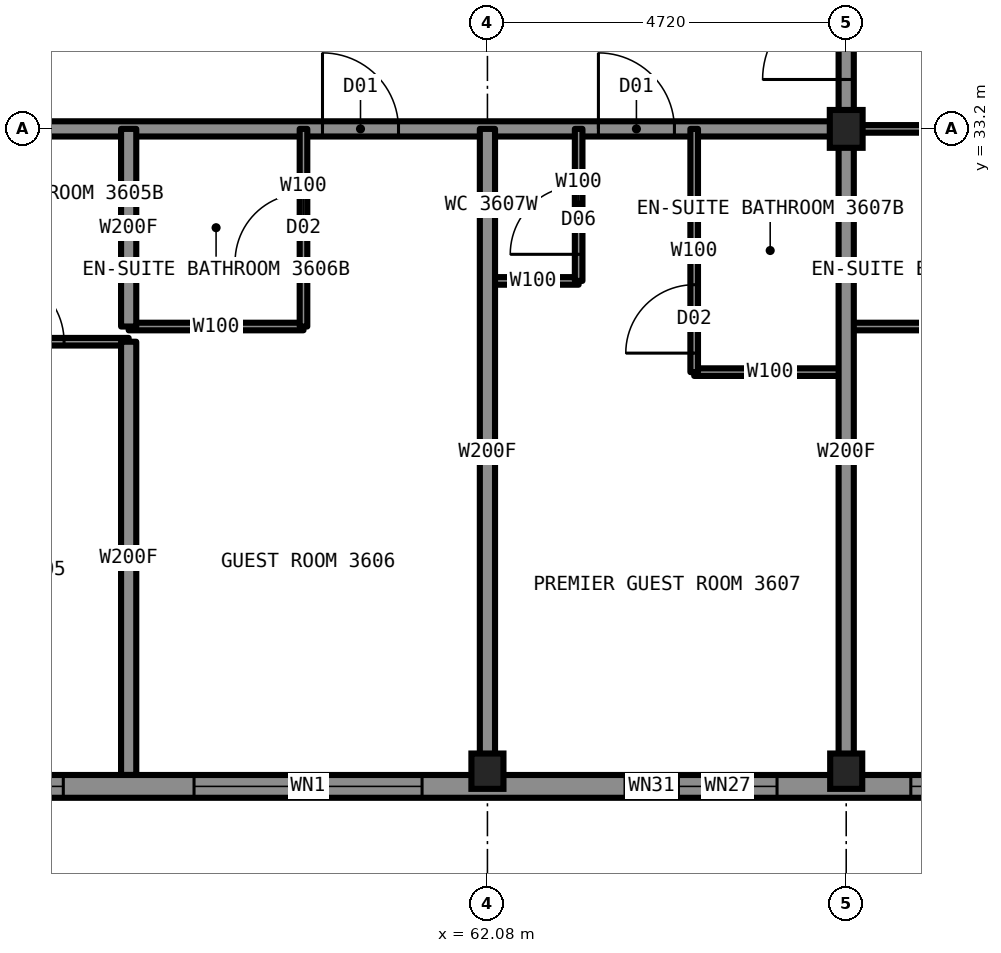
"""IFC4 building model, lengths in metres.
Left out: names, types, materials, properties, quantities, classifications, styles, units other than length and angle.
Written with IfcOpenShell. Run it as: python <this file> out.ifc"""

import sys

from ifc_helpers import new_model, si_unit, direction, frame, frame_2d, origin, origin_2d, place, context, subcontext, project, spatial, rectangle, i_section, extrude, element, fill, save


model = new_model("IFC4")
c1 = context("Model", 3, precision=1e-05, world=origin(), true_north=direction((0.0, 1.0)))
c2 = subcontext(c1, "Body", "Model", "MODEL_VIEW")
j1 = project(units=[si_unit("LENGTHUNIT", "METRE"), si_unit("PLANEANGLEUNIT", "RADIAN")], contexts=[c1])
p1 = place(None, origin())
s1 = spatial("IfcSite", under=j1, at=p1, CompositionType="ELEMENT")
p2 = place(p1, origin())
s2 = spatial("IfcBuilding", under=s1, at=p2, CompositionType="ELEMENT")
p3 = place(p2, frame((0.0, 0.0, 135.4)))
s3 = spatial("IfcBuildingStorey", under=s2, at=p3, CompositionType="ELEMENT", Elevation=135.4)
for number, where, z_axis, x_axis in (
    (1, (62.08, 24.75, 0.0), (0.0, 0.0, 1.0), (1.0, 0.0, 0.0)),
    (2, (66.8, 24.75, 0.0), (0.0, 0.0, 1.0), (1.0, 0.0, 0.0)),
):
    element("IfcColumn", number, at=place(p3, frame(where, z_axis=z_axis, x_axis=x_axis)), inside=s3, PredefinedType="COLUMN", context=c2, shape_type="SweptSolid", body=[
        extrude(i_section(OverallWidth=0.422, OverallDepth=0.465, WebThickness=0.045, FlangeThickness=0.073, at=origin_2d()), origin(), (0.0, 0.0, 1.0), 3.5),
    ])
p4 = place(p3, frame((66.8, 33.2, 0.0), z_axis=(0.0, 0.0, 1.0), x_axis=(1.0, 0.0, 0.0)))
e3 = element("IfcColumn", 3, at=p4, inside=s3, PredefinedType="COLUMN", context=c2, shape_type="SweptSolid", body=[
    extrude(i_section(OverallWidth=0.432, OverallDepth=0.498, WebThickness=0.056, FlangeThickness=0.089, at=origin_2d()), origin(), (0.0, 0.0, 1.0), 3.5),
])
p5 = place(p3, frame((66.8, 33.2, 0.0), z_axis=(0.0, 0.0, 1.0), x_axis=(1.0, 0.0, 0.0)))
e4 = element("IfcWall", 4, at=p5, inside=s3, PredefinedType="PARTITIONING", context=c2, shape_type="SweptSolid", body=[
    extrude(rectangle(XDim=2.6, YDim=0.1, at=frame_2d((1.3, 0.0))), origin(), (0.0, 0.0, 1.0), 2.573),
])
p6 = place(p3, frame((43.2, 33.2, 0.0), z_axis=(0.0, 0.0, 1.0), x_axis=(1.0, 0.0, 0.0)))
e5 = element("IfcWall", 5, at=p6, inside=s3, PredefinedType="PARTITIONING", context=c2, shape_type="SweptSolid", body=[
    extrude(rectangle(XDim=23.6, YDim=0.2, at=frame_2d((11.8, 0.0))), origin(), (0.0, 0.0, 1.0), 3.33),
])
p7 = place(p6, frame((3.0, 0.0, 0.0)))
e6 = element("IfcOpeningElement", 6, at=p7, cuts=e5, PredefinedType="OPENING", context=c2, shape_type="SweptSolid", body=[
    extrude(rectangle(XDim=1.0, YDim=2.2, at=frame_2d((0.5, 1.1))), frame((0.0, 0.11, 0.0), z_axis=(0.0, -1.0, 0.0), x_axis=(1.0, 0.0, 0.0)), (0.0, 0.0, 1.0), 0.22),
])
p8 = place(p6, frame((9.84, 0.0, 0.0)))
e7 = element("IfcOpeningElement", 7, at=p8, cuts=e5, PredefinedType="OPENING", context=c2, shape_type="SweptSolid", body=[
    extrude(rectangle(XDim=1.0, YDim=2.2, at=frame_2d((0.5, 1.1))), frame((0.0, 0.11, 0.0), z_axis=(0.0, -1.0, 0.0), x_axis=(1.0, 0.0, 0.0)), (0.0, 0.0, 1.0), 0.22),
])
p9 = place(p6, frame((16.71, 0.0, 0.0)))
e8 = element("IfcOpeningElement", 8, at=p9, cuts=e5, PredefinedType="OPENING", context=c2, shape_type="SweptSolid", body=[
    extrude(rectangle(XDim=1.0, YDim=2.2, at=frame_2d((0.5, 1.1))), frame((0.0, 0.11, 0.0), z_axis=(0.0, -1.0, 0.0), x_axis=(1.0, 0.0, 0.0)), (0.0, 0.0, 1.0), 0.22),
])
p10 = place(p6, frame((20.34, 0.0, 0.0)))
e9 = element("IfcOpeningElement", 9, at=p10, cuts=e5, PredefinedType="OPENING", context=c2, shape_type="SweptSolid", body=[
    extrude(rectangle(XDim=1.0, YDim=2.2, at=frame_2d((0.5, 1.1))), frame((0.0, 0.11, 0.0), z_axis=(0.0, -1.0, 0.0), x_axis=(1.0, 0.0, 0.0)), (0.0, 0.0, 1.0), 0.22),
])
p11 = place(p3, frame((62.08, 31.2, 0.0), z_axis=(0.0, 0.0, 1.0), x_axis=(1.0, 0.0, 0.0)))
e10 = element("IfcWall", 10, at=p11, inside=s3, PredefinedType="PARTITIONING", context=c2, shape_type="SweptSolid", body=[
    extrude(rectangle(XDim=1.2, YDim=0.1, at=frame_2d((0.6, 0.0))), origin(), (0.0, 0.0, 1.0), 3.33),
])
p12 = place(p3, frame((57.36, 30.6, 0.0), z_axis=(0.0, 0.0, 1.0), x_axis=(1.0, 0.0, 0.0)))
e11 = element("IfcWall", 11, at=p12, inside=s3, PredefinedType="PARTITIONING", context=c2, shape_type="SweptSolid", body=[
    extrude(rectangle(XDim=2.3, YDim=0.1, at=frame_2d((1.15, 0.0))), origin(), (0.0, 0.0, 1.0), 3.33),
])
p13 = place(p3, frame((66.8, 30.6, 0.0), z_axis=(0.0, 0.0, 1.0), x_axis=(1.0, 0.0, 0.0)))
e12 = element("IfcWall", 12, at=p13, inside=s3, PredefinedType="PARTITIONING", context=c2, shape_type="SweptSolid", body=[
    extrude(rectangle(XDim=2.6, YDim=0.1, at=frame_2d((1.3, 0.0))), origin(), (0.0, 0.0, 1.0), 3.33),
])
p14 = place(p3, frame((54.76, 30.4, 0.0), z_axis=(0.0, 0.0, 1.0), x_axis=(1.0, 0.0, 0.0)))
e13 = element("IfcWall", 13, at=p14, inside=s3, PredefinedType="PARTITIONING", context=c2, shape_type="SweptSolid", body=[
    extrude(rectangle(XDim=2.6, YDim=0.1, at=frame_2d((1.3, 0.0))), origin(), (0.0, 0.0, 1.0), 3.33),
])
p15 = place(p14, frame((0.85, 0.0, 0.0)))
e14 = element("IfcOpeningElement", 14, at=p15, cuts=e13, PredefinedType="OPENING", context=c2, shape_type="SweptSolid", body=[
    extrude(rectangle(XDim=0.9, YDim=2.1, at=frame_2d((0.45, 1.05))), frame((0.0, 0.06, 0.0), z_axis=(0.0, -1.0, 0.0), x_axis=(1.0, 0.0, 0.0)), (0.0, 0.0, 1.0), 0.12),
])
p16 = place(p3, frame((64.8, 30.0, 0.0), z_axis=(0.0, 0.0, 1.0), x_axis=(1.0, 0.0, 0.0)))
e15 = element("IfcWall", 15, at=p16, inside=s3, PredefinedType="PARTITIONING", context=c2, shape_type="SweptSolid", body=[
    extrude(rectangle(XDim=2.0, YDim=0.1, at=frame_2d((1.0, 0.0))), origin(), (0.0, 0.0, 1.0), 2.731),
])
p17 = place(p3, frame((66.8, 33.2, 0.0), z_axis=(0.0, 0.0, 1.0), x_axis=(0.0, 1.0, 0.0)))
e16 = element("IfcWall", 16, at=p17, inside=s3, PredefinedType="PARTITIONING", context=c2, shape_type="SweptSolid", body=[
    extrude(rectangle(XDim=23.6, YDim=0.2, at=frame_2d((11.8, 0.0))), origin(), (0.0, 0.0, 1.0), 3.33),
])
p18 = place(p17, frame((7.27, 0.0, 0.0)))
e17 = element("IfcOpeningElement", 17, at=p18, cuts=e16, PredefinedType="OPENING", context=c2, shape_type="SweptSolid", body=[
    extrude(rectangle(XDim=1.0, YDim=2.2, at=frame_2d((0.5, 1.1))), frame((0.0, 0.11, 0.0), z_axis=(0.0, -1.0, 0.0), x_axis=(1.0, 0.0, 0.0)), (0.0, 0.0, 1.0), 0.22),
])
p19 = place(p17, frame((11.99, 0.0, 0.0)))
e18 = element("IfcOpeningElement", 18, at=p19, cuts=e16, PredefinedType="OPENING", context=c2, shape_type="SweptSolid", body=[
    extrude(rectangle(XDim=1.0, YDim=2.2, at=frame_2d((0.5, 1.1))), frame((0.0, 0.11, 0.0), z_axis=(0.0, -1.0, 0.0), x_axis=(1.0, 0.0, 0.0)), (0.0, 0.0, 1.0), 0.22),
])
p20 = place(p17, frame((17.31, 0.0, 0.0)))
e19 = element("IfcOpeningElement", 19, at=p20, cuts=e16, PredefinedType="OPENING", context=c2, shape_type="SweptSolid", body=[
    extrude(rectangle(XDim=1.0, YDim=2.2, at=frame_2d((0.5, 1.1))), frame((0.0, 0.11, 0.0), z_axis=(0.0, -1.0, 0.0), x_axis=(1.0, 0.0, 0.0)), (0.0, 0.0, 1.0), 0.22),
])
p21 = place(p17, frame((21.85, 0.0, 0.0)))
e20 = element("IfcOpeningElement", 20, at=p21, cuts=e16, PredefinedType="OPENING", context=c2, shape_type="SweptSolid", body=[
    extrude(rectangle(XDim=1.1, YDim=2.2, at=frame_2d((0.55, 1.1))), frame((0.0, 0.11, 0.0), z_axis=(0.0, -1.0, 0.0), x_axis=(1.0, 0.0, 0.0)), (0.0, 0.0, 1.0), 0.22),
])
p22 = place(p17, frame((0.65, 0.0, 0.0)))
e21 = element("IfcOpeningElement", 21, at=p22, cuts=e16, PredefinedType="OPENING", context=c2, shape_type="SweptSolid", body=[
    extrude(rectangle(XDim=1.1, YDim=2.2, at=frame_2d((0.55, 1.1))), frame((0.0, 0.11, 0.0), z_axis=(0.0, -1.0, 0.0), x_axis=(1.0, 0.0, 0.0)), (0.0, 0.0, 1.0), 0.22),
])
p23 = place(p3, frame((66.8, 24.7, 0.0), z_axis=(0.0, 0.0, 1.0), x_axis=(0.0, 1.0, 0.0)))
e22 = element("IfcWall", 22, at=p23, inside=s3, PredefinedType="PARTITIONING", context=c2, shape_type="SweptSolid", body=[
    extrude(rectangle(XDim=8.5, YDim=0.2, at=frame_2d((4.25, 0.0))), origin(), (0.0, 0.0, 1.0), 2.573),
])
p24 = place(p3, frame((57.36, 24.7, 0.0), z_axis=(0.0, 0.0, 1.0), x_axis=(0.0, 1.0, 0.0)))
e23 = element("IfcWall", 23, at=p24, inside=s3, PredefinedType="PARTITIONING", context=c2, shape_type="SweptSolid", body=[
    extrude(rectangle(XDim=5.7, YDim=0.2, at=frame_2d((2.85, 0.0))), origin(), (0.0, 0.0, 1.0), 3.33),
])
p25 = place(p3, frame((57.36, 30.6, 0.0), z_axis=(0.0, 0.0, 1.0), x_axis=(0.0, 1.0, 0.0)))
e24 = element("IfcWall", 24, at=p25, inside=s3, PredefinedType="PARTITIONING", context=c2, shape_type="SweptSolid", body=[
    extrude(rectangle(XDim=2.6, YDim=0.2, at=frame_2d((1.3, 0.0))), origin(), (0.0, 0.0, 1.0), 3.33),
])
p26 = place(p3, frame((59.66, 30.6, 0.0), z_axis=(0.0, 0.0, 1.0), x_axis=(0.0, 1.0, 0.0)))
e25 = element("IfcWall", 25, at=p26, inside=s3, PredefinedType="PARTITIONING", context=c2, shape_type="SweptSolid", body=[
    extrude(rectangle(XDim=2.6, YDim=0.1, at=frame_2d((1.3, 0.0))), origin(), (0.0, 0.0, 1.0), 3.33),
])
p27 = place(p26, frame((0.85, 0.0, 0.0)))
e26 = element("IfcOpeningElement", 26, at=p27, cuts=e25, PredefinedType="OPENING", context=c2, shape_type="SweptSolid", body=[
    extrude(rectangle(XDim=0.9, YDim=2.1, at=frame_2d((0.45, 1.05))), frame((0.0, 0.06, 0.0), z_axis=(0.0, -1.0, 0.0), x_axis=(1.0, 0.0, 0.0)), (0.0, 0.0, 1.0), 0.12),
])
p28 = place(p3, frame((62.08, 24.7, 0.0), z_axis=(0.0, 0.0, 1.0), x_axis=(0.0, 1.0, 0.0)))
e27 = element("IfcWall", 27, at=p28, inside=s3, PredefinedType="PARTITIONING", context=c2, shape_type="SweptSolid", body=[
    extrude(rectangle(XDim=8.5, YDim=0.2, at=frame_2d((4.25, 0.0))), origin(), (0.0, 0.0, 1.0), 2.573),
])
p29 = place(p3, frame((63.28, 31.2, 0.0), z_axis=(0.0, 0.0, 1.0), x_axis=(0.0, 1.0, 0.0)))
e28 = element("IfcWall", 28, at=p29, inside=s3, PredefinedType="PARTITIONING", context=c2, shape_type="SweptSolid", body=[
    extrude(rectangle(XDim=2.0, YDim=0.1, at=frame_2d((1.0, 0.0))), origin(), (0.0, 0.0, 1.0), 3.33),
])
p30 = place(p29, frame((0.35, 0.0, 0.0)))
e29 = element("IfcOpeningElement", 29, at=p30, cuts=e28, PredefinedType="OPENING", context=c2, shape_type="SweptSolid", body=[
    extrude(rectangle(XDim=0.9, YDim=2.1, at=frame_2d((0.45, 1.05))), frame((0.0, 0.06, 0.0), z_axis=(0.0, -1.0, 0.0), x_axis=(1.0, 0.0, 0.0)), (0.0, 0.0, 1.0), 0.12),
])
p31 = place(p3, frame((64.8, 30.0, 0.0), z_axis=(0.0, 0.0, 1.0), x_axis=(0.0, 1.0, 0.0)))
e30 = element("IfcWall", 30, at=p31, inside=s3, PredefinedType="PARTITIONING", context=c2, shape_type="SweptSolid", body=[
    extrude(rectangle(XDim=3.2, YDim=0.1, at=frame_2d((1.6, 0.0))), origin(), (0.0, 0.0, 1.0), 3.33),
])
p32 = place(p31, frame((0.25, 0.0, 0.0)))
e31 = element("IfcOpeningElement", 31, at=p32, cuts=e30, PredefinedType="OPENING", context=c2, shape_type="SweptSolid", body=[
    extrude(rectangle(XDim=0.9, YDim=2.1, at=frame_2d((0.45, 1.05))), frame((0.0, 0.06, 0.0), z_axis=(0.0, -1.0, 0.0), x_axis=(1.0, 0.0, 0.0)), (0.0, 0.0, 1.0), 0.12),
])
p33 = place(p3, frame((39.9, 24.55, 0.0), z_axis=(0.0, 0.0, 1.0), x_axis=(1.0, 0.0, 0.0)))
e32 = element("IfcWall", 32, at=p33, inside=s3, PredefinedType="SOLIDWALL", context=c2, shape_type="SweptSolid", body=[
    extrude(rectangle(XDim=30.2, YDim=0.3, at=frame_2d((15.1, 0.0))), origin(), (0.0, 0.0, 1.0), 2.83),
])
p34 = place(p33, frame((0.85, 0.0, 0.5)))
e33 = element("IfcOpeningElement", 33, at=p34, cuts=e32, PredefinedType="OPENING", context=c2, shape_type="SweptSolid", body=[
    extrude(rectangle(XDim=1.6, YDim=2.0, at=frame_2d((0.8, 1.0))), frame((0.0, 0.16, 0.0), z_axis=(0.0, -1.0, 0.0), x_axis=(1.0, 0.0, 0.0)), (0.0, 0.0, 1.0), 0.32),
])
p35 = place(p33, frame((4.16, 0.0, 0.5)))
e34 = element("IfcOpeningElement", 34, at=p35, cuts=e32, PredefinedType="OPENING", context=c2, shape_type="SweptSolid", body=[
    extrude(rectangle(XDim=1.3, YDim=1.9, at=frame_2d((0.65, 0.95))), frame((0.0, 0.16, 0.0), z_axis=(0.0, -1.0, 0.0), x_axis=(1.0, 0.0, 0.0)), (0.0, 0.0, 1.0), 0.32),
])
p36 = place(p33, frame((8.88, 0.0, 0.5)))
e35 = element("IfcOpeningElement", 35, at=p36, cuts=e32, PredefinedType="OPENING", context=c2, shape_type="SweptSolid", body=[
    extrude(rectangle(XDim=3.0, YDim=2.0, at=frame_2d((1.5, 1.0))), frame((0.0, 0.16, 0.0), z_axis=(0.0, -1.0, 0.0), x_axis=(1.0, 0.0, 0.0)), (0.0, 0.0, 1.0), 0.32),
])
p37 = place(p33, frame((13.6, 0.0, 0.5)))
e36 = element("IfcOpeningElement", 36, at=p37, cuts=e32, PredefinedType="OPENING", context=c2, shape_type="SweptSolid", body=[
    extrude(rectangle(XDim=3.0, YDim=2.0, at=frame_2d((1.5, 1.0))), frame((0.0, 0.16, 0.0), z_axis=(0.0, -1.0, 0.0), x_axis=(1.0, 0.0, 0.0)), (0.0, 0.0, 1.0), 0.32),
])
p38 = place(p33, frame((18.32, 0.0, 0.5)))
e37 = element("IfcOpeningElement", 37, at=p38, cuts=e32, PredefinedType="OPENING", context=c2, shape_type="SweptSolid", body=[
    extrude(rectangle(XDim=3.0, YDim=2.0, at=frame_2d((1.5, 1.0))), frame((0.0, 0.16, 0.0), z_axis=(0.0, -1.0, 0.0), x_axis=(1.0, 0.0, 0.0)), (0.0, 0.0, 1.0), 0.32),
])
p39 = place(p33, frame((24.69, 0.0, 0.5)))
e38 = element("IfcOpeningElement", 38, at=p39, cuts=e32, PredefinedType="OPENING", context=c2, shape_type="SweptSolid", body=[
    extrude(rectangle(XDim=1.3, YDim=1.9, at=frame_2d((0.65, 0.95))), frame((0.0, 0.16, 0.0), z_axis=(0.0, -1.0, 0.0), x_axis=(1.0, 0.0, 0.0)), (0.0, 0.0, 1.0), 0.32),
])
p40 = place(p33, frame((27.75, 0.0, 0.5)))
e39 = element("IfcOpeningElement", 39, at=p40, cuts=e32, PredefinedType="OPENING", context=c2, shape_type="SweptSolid", body=[
    extrude(rectangle(XDim=1.6, YDim=2.0, at=frame_2d((0.8, 1.0))), frame((0.0, 0.16, 0.0), z_axis=(0.0, -1.0, 0.0), x_axis=(1.0, 0.0, 0.0)), (0.0, 0.0, 1.0), 0.32),
])
p41 = place(p33, frame((5.51, 0.0, 0.5)))
e40 = element("IfcOpeningElement", 40, at=p41, cuts=e32, PredefinedType="OPENING", context=c2, shape_type="SweptSolid", body=[
    extrude(rectangle(XDim=0.7, YDim=0.9, at=frame_2d((0.35, 0.45))), frame((0.0, 0.16, 0.0), z_axis=(0.0, -1.0, 0.0), x_axis=(1.0, 0.0, 0.0)), (0.0, 0.0, 1.0), 0.32),
])
p42 = place(p33, frame((23.99, 0.0, 0.5)))
e41 = element("IfcOpeningElement", 41, at=p42, cuts=e32, PredefinedType="OPENING", context=c2, shape_type="SweptSolid", body=[
    extrude(rectangle(XDim=0.7, YDim=0.9, at=frame_2d((0.35, 0.45))), frame((0.0, 0.16, 0.0), z_axis=(0.0, -1.0, 0.0), x_axis=(1.0, 0.0, 0.0)), (0.0, 0.0, 1.0), 0.32),
])
p43 = place(p15, origin())
e42 = element("IfcDoor", 42, at=p43, inside=s3, OperationType="SINGLE_SWING_RIGHT", PredefinedType="DOOR", context=c2, shape_type="SweptSolid", body=[
    extrude(rectangle(XDim=0.9, YDim=2.1, at=frame_2d((0.45, 1.05))), frame((0.0, 0.025, 0.0), z_axis=(0.0, -1.0, 0.0), x_axis=(1.0, 0.0, 0.0)), (0.0, 0.0, 1.0), 0.05),
])
fill(e14, e42)
p44 = place(p9, origin())
e43 = element("IfcDoor", 43, at=p44, inside=s3, OperationType="SINGLE_SWING_LEFT", PredefinedType="DOOR", context=c2, shape_type="SweptSolid", body=[
    extrude(rectangle(XDim=1.0, YDim=2.2, at=frame_2d((0.5, 1.1))), frame((0.0, 0.025, 0.0), z_axis=(0.0, -1.0, 0.0), x_axis=(1.0, 0.0, 0.0)), (0.0, 0.0, 1.0), 0.05),
])
fill(e8, e43)
p45 = place(p27, origin())
e44 = element("IfcDoor", 44, at=p45, inside=s3, OperationType="SINGLE_SWING_RIGHT", PredefinedType="DOOR", context=c2, shape_type="SweptSolid", body=[
    extrude(rectangle(XDim=0.9, YDim=2.1, at=frame_2d((0.45, 1.05))), frame((0.0, 0.025, 0.0), z_axis=(0.0, -1.0, 0.0), x_axis=(1.0, 0.0, 0.0)), (0.0, 0.0, 1.0), 0.05),
])
fill(e26, e44)
p46 = place(p10, origin())
e45 = element("IfcDoor", 45, at=p46, inside=s3, OperationType="SINGLE_SWING_LEFT", PredefinedType="DOOR", context=c2, shape_type="SweptSolid", body=[
    extrude(rectangle(XDim=1.0, YDim=2.2, at=frame_2d((0.5, 1.1))), frame((0.0, 0.025, 0.0), z_axis=(0.0, -1.0, 0.0), x_axis=(1.0, 0.0, 0.0)), (0.0, 0.0, 1.0), 0.05),
])
fill(e9, e45)
p47 = place(p32, origin())
e46 = element("IfcDoor", 46, at=p47, inside=s3, OperationType="SINGLE_SWING_RIGHT", PredefinedType="DOOR", context=c2, shape_type="SweptSolid", body=[
    extrude(rectangle(XDim=0.9, YDim=2.1, at=frame_2d((0.45, 1.05))), frame((0.0, 0.025, 0.0), z_axis=(0.0, -1.0, 0.0), x_axis=(1.0, 0.0, 0.0)), (0.0, 0.0, 1.0), 0.05),
])
fill(e31, e46)
p48 = place(p30, origin())
e47 = element("IfcDoor", 47, at=p48, inside=s3, OperationType="SINGLE_SWING_LEFT", PredefinedType="DOOR", context=c2, shape_type="SweptSolid", body=[
    extrude(rectangle(XDim=0.9, YDim=2.1, at=frame_2d((0.45, 1.05))), frame((0.0, 0.025, 0.0), z_axis=(0.0, -1.0, 0.0), x_axis=(1.0, 0.0, 0.0)), (0.0, 0.0, 1.0), 0.05),
])
fill(e29, e47)
p49 = place(p22, origin())
e48 = element("IfcDoor", 48, at=p49, inside=s3, OperationType="SINGLE_SWING_LEFT", PredefinedType="DOOR", context=c2, shape_type="SweptSolid", body=[
    extrude(rectangle(XDim=1.1, YDim=2.2, at=frame_2d((0.55, 1.1))), frame((0.0, 0.025, 0.0), z_axis=(0.0, -1.0, 0.0), x_axis=(1.0, 0.0, 0.0)), (0.0, 0.0, 1.0), 0.05),
])
fill(e21, e48)
p50 = place(p37, origin())
e49 = element("IfcWindow", 49, at=p50, inside=s3, PartitioningType="SINGLE_PANEL", PredefinedType="WINDOW", context=c2, shape_type="SweptSolid", body=[
    extrude(rectangle(XDim=3.0, YDim=2.0, at=frame_2d((1.5, 1.0))), frame((0.0, 0.03, 0.0), z_axis=(0.0, -1.0, 0.0), x_axis=(1.0, 0.0, 0.0)), (0.0, 0.0, 1.0), 0.06),
])
fill(e36, e49)
p51 = place(p38, origin())
e50 = element("IfcWindow", 50, at=p51, inside=s3, PartitioningType="SINGLE_PANEL", PredefinedType="WINDOW", context=c2, shape_type="SweptSolid", body=[
    extrude(rectangle(XDim=3.0, YDim=2.0, at=frame_2d((1.5, 1.0))), frame((0.0, 0.03, 0.0), z_axis=(0.0, -1.0, 0.0), x_axis=(1.0, 0.0, 0.0)), (0.0, 0.0, 1.0), 0.06),
])
fill(e37, e50)
p52 = place(p39, origin())
e51 = element("IfcWindow", 51, at=p52, inside=s3, PartitioningType="SINGLE_PANEL", PredefinedType="WINDOW", context=c2, shape_type="SweptSolid", body=[
    extrude(rectangle(XDim=1.3, YDim=1.9, at=frame_2d((0.65, 0.95))), frame((0.0, 0.03, 0.0), z_axis=(0.0, -1.0, 0.0), x_axis=(1.0, 0.0, 0.0)), (0.0, 0.0, 1.0), 0.06),
])
fill(e38, e51)
p53 = place(p40, origin())
e52 = element("IfcWindow", 52, at=p53, inside=s3, PartitioningType="SINGLE_PANEL", PredefinedType="WINDOW", context=c2, shape_type="SweptSolid", body=[
    extrude(rectangle(XDim=1.6, YDim=2.0, at=frame_2d((0.8, 1.0))), frame((0.0, 0.03, 0.0), z_axis=(0.0, -1.0, 0.0), x_axis=(1.0, 0.0, 0.0)), (0.0, 0.0, 1.0), 0.06),
])
fill(e39, e52)
p54 = place(p42, origin())
e53 = element("IfcWindow", 53, at=p54, inside=s3, PartitioningType="SINGLE_PANEL", PredefinedType="WINDOW", context=c2, shape_type="SweptSolid", body=[
    extrude(rectangle(XDim=0.7, YDim=0.9, at=frame_2d((0.35, 0.45))), frame((0.0, 0.03, 0.0), z_axis=(0.0, -1.0, 0.0), x_axis=(1.0, 0.0, 0.0)), (0.0, 0.0, 1.0), 0.06),
])
fill(e41, e53)
save(model, sys.argv[1])
